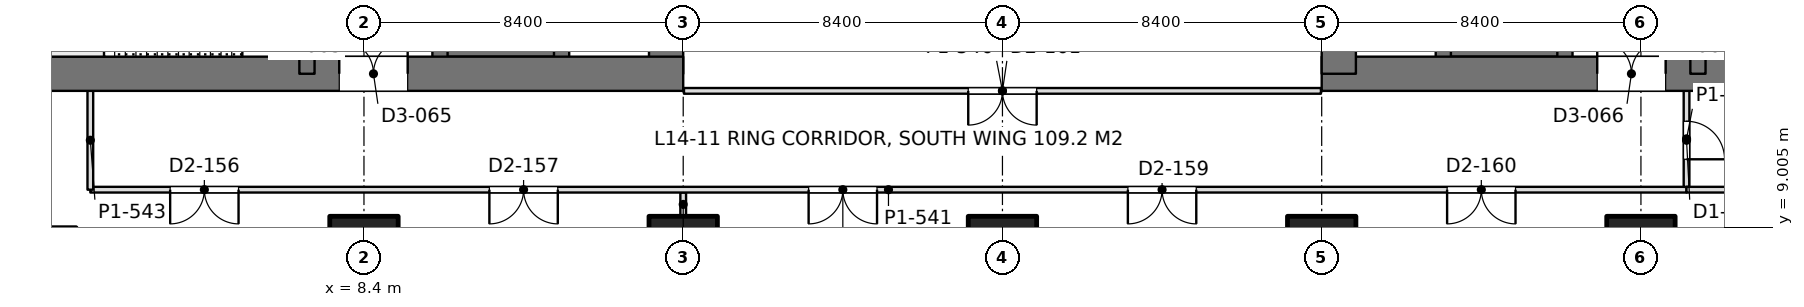
"""IFC4 building model, lengths in metres.
Left out: names, types, materials, properties, quantities, classifications, styles, units other than length and angle.
Written with IfcOpenShell. Run it as: python <this file> out.ifc"""

import sys

from ifc_helpers import new_model, si_unit, direction, frame, frame_2d, origin, origin_2d, place, context, subcontext, project, spatial, rectangle, extrude, element, fill, save


model = new_model("IFC4")
c1 = context("Model", 3, precision=1e-05, world=origin(), true_north=direction((0.0, 1.0)))
c2 = subcontext(c1, "Body", "Model", "MODEL_VIEW")
j1 = project(units=[si_unit("LENGTHUNIT", "METRE"), si_unit("PLANEANGLEUNIT", "RADIAN")], contexts=[c1])
p1 = place(None, origin())
s1 = spatial("IfcSite", under=j1, at=p1, CompositionType="ELEMENT")
p2 = place(p1, origin())
s2 = spatial("IfcBuilding", under=s1, at=p2, CompositionType="ELEMENT")
p3 = place(p2, frame((0.0, 0.0, 63.9)))
s3 = spatial("IfcBuildingStorey", under=s2, at=p3, CompositionType="ELEMENT", Elevation=63.9)
for number, where, z_axis, x_axis in (
    (1, (8.4, 8.4, 0.0), (0.0, 0.0, 1.0), (1.0, 0.0, 0.0)),
    (2, (16.8, 8.4, 0.0), (0.0, 0.0, 1.0), (1.0, 0.0, 0.0)),
    (3, (25.2, 8.4, 0.0), (0.0, 0.0, 1.0), (1.0, 0.0, 0.0)),
    (4, (33.6, 8.4, 0.0), (0.0, 0.0, 1.0), (1.0, 0.0, 0.0)),
    (5, (42.0, 8.4, 0.0), (0.0, 0.0, 1.0), (1.0, 0.0, 0.0)),
):
    element("IfcColumn", number, at=place(p3, frame(where, z_axis=z_axis, x_axis=x_axis)), inside=s3, PredefinedType="COLUMN", context=c2, shape_type="SweptSolid", body=[
        extrude(rectangle(XDim=1.8, YDim=1.8, at=origin_2d()), origin(), (0.0, 0.0, 1.0), 4.5),
    ])
p4 = place(p3, frame((-1.2, 13.05, 0.0), z_axis=(0.0, 0.0, 1.0), x_axis=(1.0, 0.0, 0.0)))
e6 = element("IfcWall", 6, at=p4, inside=s3, PredefinedType="SHEAR", context=c2, shape_type="SweptSolid", body=[
    extrude(rectangle(XDim=18.0, YDim=0.9, at=frame_2d((9.0, 0.0))), origin(), (0.0, 0.0, 1.0), 4.5),
])
p5 = place(p4, frame((8.95, 0.0, 0.0)))
e7 = element("IfcOpeningElement", 7, at=p5, cuts=e6, PredefinedType="OPENING", context=c2, shape_type="SweptSolid", body=[
    extrude(rectangle(XDim=1.8, YDim=2.4, at=frame_2d((0.9, 1.2))), frame((0.0, 0.46, 0.0), z_axis=(0.0, -1.0, 0.0), x_axis=(1.0, 0.0, 0.0)), (0.0, 0.0, 1.0), 0.92),
])
p6 = place(p3, frame((16.35, 13.05, 0.0), z_axis=(0.0, 0.0, 1.0), x_axis=(0.0, 1.0, 0.0)))
e8 = element("IfcWall", 8, at=p6, inside=s3, PredefinedType="SHEAR", context=c2, shape_type="SweptSolid", body=[
    extrude(rectangle(XDim=24.3, YDim=0.9, at=frame_2d((12.15, 0.0))), origin(), (0.0, 0.0, 1.0), 4.5),
])
p7 = place(p3, frame((6.9, 13.05, 0.0), z_axis=(0.0, 0.0, 1.0), x_axis=(0.0, 1.0, 0.0)))
e9 = element("IfcWall", 9, at=p7, inside=s3, PredefinedType="SHEAR", context=c2, shape_type="SweptSolid", body=[
    extrude(rectangle(XDim=24.3, YDim=0.4, at=frame_2d((12.15, 0.0))), origin(), (0.0, 0.0, 1.0), 4.5),
])
p8 = place(p7, frame((1.3, 0.0, 0.0)))
e10 = element("IfcOpeningElement", 10, at=p8, cuts=e9, PredefinedType="OPENING", context=c2, shape_type="SweptSolid", body=[
    extrude(rectangle(XDim=1.0, YDim=2.2, at=frame_2d((0.5, 1.1))), frame((0.0, 0.21, 0.0), z_axis=(0.0, -1.0, 0.0), x_axis=(1.0, 0.0, 0.0)), (0.0, 0.0, 1.0), 0.42),
])
p9 = place(p7, frame((22.0, 0.0, 0.0)))
e11 = element("IfcOpeningElement", 11, at=p9, cuts=e9, PredefinedType="OPENING", context=c2, shape_type="SweptSolid", body=[
    extrude(rectangle(XDim=1.0, YDim=2.2, at=frame_2d((0.5, 1.1))), frame((0.0, 0.21, 0.0), z_axis=(0.0, -1.0, 0.0), x_axis=(1.0, 0.0, 0.0)), (0.0, 0.0, 1.0), 0.42),
])
p10 = place(p7, frame((5.55, 0.0, 0.0)))
e12 = element("IfcOpeningElement", 12, at=p10, cuts=e9, PredefinedType="OPENING", context=c2, shape_type="SweptSolid", body=[
    extrude(rectangle(XDim=1.0, YDim=2.2, at=frame_2d((0.5, 1.1))), frame((0.0, 0.21, 0.0), z_axis=(0.0, -1.0, 0.0), x_axis=(1.0, 0.0, 0.0)), (0.0, 0.0, 1.0), 0.42),
])
p11 = place(p7, frame((9.55, 0.0, 0.0)))
e13 = element("IfcOpeningElement", 13, at=p11, cuts=e9, PredefinedType="OPENING", context=c2, shape_type="SweptSolid", body=[
    extrude(rectangle(XDim=1.0, YDim=2.2, at=frame_2d((0.5, 1.1))), frame((0.0, 0.21, 0.0), z_axis=(0.0, -1.0, 0.0), x_axis=(1.0, 0.0, 0.0)), (0.0, 0.0, 1.0), 0.42),
])
p12 = place(p7, frame((12.8, 0.0, 0.0)))
e14 = element("IfcOpeningElement", 14, at=p12, cuts=e9, PredefinedType="OPENING", context=c2, shape_type="SweptSolid", body=[
    extrude(rectangle(XDim=1.1, YDim=2.2, at=frame_2d((0.55, 1.1))), frame((0.0, 0.21, 0.0), z_axis=(0.0, -1.0, 0.0), x_axis=(1.0, 0.0, 0.0)), (0.0, 0.0, 1.0), 0.42),
])
p13 = place(p7, frame((15.538, 0.0, 0.0)))
e15 = element("IfcOpeningElement", 15, at=p13, cuts=e9, PredefinedType="OPENING", context=c2, shape_type="SweptSolid", body=[
    extrude(rectangle(XDim=1.1, YDim=2.2, at=frame_2d((0.55, 1.1))), frame((0.0, 0.21, 0.0), z_axis=(0.0, -1.0, 0.0), x_axis=(1.0, 0.0, 0.0)), (0.0, 0.0, 1.0), 0.42),
])
p14 = place(p7, frame((18.262, 0.0, 0.0)))
e16 = element("IfcOpeningElement", 16, at=p14, cuts=e9, PredefinedType="OPENING", context=c2, shape_type="SweptSolid", body=[
    extrude(rectangle(XDim=1.1, YDim=2.2, at=frame_2d((0.55, 1.1))), frame((0.0, 0.21, 0.0), z_axis=(0.0, -1.0, 0.0), x_axis=(1.0, 0.0, 0.0)), (0.0, 0.0, 1.0), 0.42),
])
p15 = place(p3, frame((10.4, 13.05, 0.0), z_axis=(0.0, 0.0, 1.0), x_axis=(0.0, 1.0, 0.0)))
e17 = element("IfcWall", 17, at=p15, inside=s3, PredefinedType="SHEAR", context=c2, shape_type="SweptSolid", body=[
    extrude(rectangle(XDim=24.3, YDim=0.4, at=frame_2d((12.15, 0.0))), origin(), (0.0, 0.0, 1.0), 4.5),
])
p16 = place(p15, frame((1.5, 0.0, 0.0)))
e18 = element("IfcOpeningElement", 18, at=p16, cuts=e17, PredefinedType="OPENING", context=c2, shape_type="SweptSolid", body=[
    extrude(rectangle(XDim=1.1, YDim=2.2, at=frame_2d((0.55, 1.1))), frame((0.0, 0.21, 0.0), z_axis=(0.0, -1.0, 0.0), x_axis=(1.0, 0.0, 0.0)), (0.0, 0.0, 1.0), 0.42),
])
p17 = place(p15, frame((4.35, 0.0, 0.0)))
e19 = element("IfcOpeningElement", 19, at=p17, cuts=e17, PredefinedType="OPENING", context=c2, shape_type="SweptSolid", body=[
    extrude(rectangle(XDim=1.1, YDim=2.2, at=frame_2d((0.55, 1.1))), frame((0.0, 0.21, 0.0), z_axis=(0.0, -1.0, 0.0), x_axis=(1.0, 0.0, 0.0)), (0.0, 0.0, 1.0), 0.42),
])
p18 = place(p15, frame((7.2, 0.0, 0.0)))
e20 = element("IfcOpeningElement", 20, at=p18, cuts=e17, PredefinedType="OPENING", context=c2, shape_type="SweptSolid", body=[
    extrude(rectangle(XDim=1.1, YDim=2.2, at=frame_2d((0.55, 1.1))), frame((0.0, 0.21, 0.0), z_axis=(0.0, -1.0, 0.0), x_axis=(1.0, 0.0, 0.0)), (0.0, 0.0, 1.0), 0.42),
])
p19 = place(p15, frame((21.45, 0.0, 0.0)))
e21 = element("IfcOpeningElement", 21, at=p19, cuts=e17, PredefinedType="OPENING", context=c2, shape_type="SweptSolid", body=[
    extrude(rectangle(XDim=1.1, YDim=2.2, at=frame_2d((0.55, 1.1))), frame((0.0, 0.21, 0.0), z_axis=(0.0, -1.0, 0.0), x_axis=(1.0, 0.0, 0.0)), (0.0, 0.0, 1.0), 0.42),
])
p20 = place(p3, frame((13.6, 13.05, 0.0), z_axis=(0.0, 0.0, 1.0), x_axis=(0.0, 1.0, 0.0)))
e22 = element("IfcWall", 22, at=p20, inside=s3, PredefinedType="SHEAR", context=c2, shape_type="SweptSolid", body=[
    extrude(rectangle(XDim=24.3, YDim=0.4, at=frame_2d((12.15, 0.0))), origin(), (0.0, 0.0, 1.0), 4.5),
])
p21 = place(p3, frame((10.4, 13.65, 0.0), z_axis=(0.0, 0.0, 1.0), x_axis=(1.0, 0.0, 0.0)))
e23 = element("IfcWall", 23, at=p21, inside=s3, PredefinedType="SHEAR", context=c2, shape_type="SweptSolid", body=[
    extrude(rectangle(XDim=3.2, YDim=0.3, at=frame_2d((1.6, 0.0))), origin(), (0.0, 0.0, 1.0), 4.5),
])
p22 = place(p3, frame((33.6, 13.05, 0.0), z_axis=(0.0, 0.0, 1.0), x_axis=(1.0, 0.0, 0.0)))
e24 = element("IfcWall", 24, at=p22, inside=s3, PredefinedType="SHEAR", context=c2, shape_type="SweptSolid", body=[
    extrude(rectangle(XDim=18.0, YDim=0.9, at=frame_2d((9.0, 0.0))), origin(), (0.0, 0.0, 1.0), 4.5),
])
p23 = place(p22, frame((7.25, 0.0, 0.0)))
e25 = element("IfcOpeningElement", 25, at=p23, cuts=e24, PredefinedType="OPENING", context=c2, shape_type="SweptSolid", body=[
    extrude(rectangle(XDim=1.8, YDim=2.4, at=frame_2d((0.9, 1.2))), frame((0.0, 0.46, 0.0), z_axis=(0.0, -1.0, 0.0), x_axis=(1.0, 0.0, 0.0)), (0.0, 0.0, 1.0), 0.92),
])
p24 = place(p3, frame((34.05, 13.05, 0.0), z_axis=(0.0, 0.0, 1.0), x_axis=(0.0, 1.0, 0.0)))
e26 = element("IfcWall", 26, at=p24, inside=s3, PredefinedType="SHEAR", context=c2, shape_type="SweptSolid", body=[
    extrude(rectangle(XDim=24.3, YDim=0.9, at=frame_2d((12.15, 0.0))), origin(), (0.0, 0.0, 1.0), 4.5),
])
p25 = place(p3, frame((43.5, 13.05, 0.0), z_axis=(0.0, 0.0, 1.0), x_axis=(0.0, 1.0, 0.0)))
e27 = element("IfcWall", 27, at=p25, inside=s3, PredefinedType="SHEAR", context=c2, shape_type="SweptSolid", body=[
    extrude(rectangle(XDim=24.3, YDim=0.4, at=frame_2d((12.15, 0.0))), origin(), (0.0, 0.0, 1.0), 4.5),
])
p26 = place(p25, frame((1.3, 0.0, 0.0)))
e28 = element("IfcOpeningElement", 28, at=p26, cuts=e27, PredefinedType="OPENING", context=c2, shape_type="SweptSolid", body=[
    extrude(rectangle(XDim=1.0, YDim=2.2, at=frame_2d((0.5, 1.1))), frame((0.0, 0.21, 0.0), z_axis=(0.0, -1.0, 0.0), x_axis=(1.0, 0.0, 0.0)), (0.0, 0.0, 1.0), 0.42),
])
p27 = place(p25, frame((22.0, 0.0, 0.0)))
e29 = element("IfcOpeningElement", 29, at=p27, cuts=e27, PredefinedType="OPENING", context=c2, shape_type="SweptSolid", body=[
    extrude(rectangle(XDim=1.0, YDim=2.2, at=frame_2d((0.5, 1.1))), frame((0.0, 0.21, 0.0), z_axis=(0.0, -1.0, 0.0), x_axis=(1.0, 0.0, 0.0)), (0.0, 0.0, 1.0), 0.42),
])
p28 = place(p25, frame((5.55, 0.0, 0.0)))
e30 = element("IfcOpeningElement", 30, at=p28, cuts=e27, PredefinedType="OPENING", context=c2, shape_type="SweptSolid", body=[
    extrude(rectangle(XDim=1.0, YDim=2.2, at=frame_2d((0.5, 1.1))), frame((0.0, 0.21, 0.0), z_axis=(0.0, -1.0, 0.0), x_axis=(1.0, 0.0, 0.0)), (0.0, 0.0, 1.0), 0.42),
])
p29 = place(p25, frame((9.55, 0.0, 0.0)))
e31 = element("IfcOpeningElement", 31, at=p29, cuts=e27, PredefinedType="OPENING", context=c2, shape_type="SweptSolid", body=[
    extrude(rectangle(XDim=1.0, YDim=2.2, at=frame_2d((0.5, 1.1))), frame((0.0, 0.21, 0.0), z_axis=(0.0, -1.0, 0.0), x_axis=(1.0, 0.0, 0.0)), (0.0, 0.0, 1.0), 0.42),
])
p30 = place(p25, frame((12.8, 0.0, 0.0)))
e32 = element("IfcOpeningElement", 32, at=p30, cuts=e27, PredefinedType="OPENING", context=c2, shape_type="SweptSolid", body=[
    extrude(rectangle(XDim=1.1, YDim=2.2, at=frame_2d((0.55, 1.1))), frame((0.0, 0.21, 0.0), z_axis=(0.0, -1.0, 0.0), x_axis=(1.0, 0.0, 0.0)), (0.0, 0.0, 1.0), 0.42),
])
p31 = place(p25, frame((15.538, 0.0, 0.0)))
e33 = element("IfcOpeningElement", 33, at=p31, cuts=e27, PredefinedType="OPENING", context=c2, shape_type="SweptSolid", body=[
    extrude(rectangle(XDim=1.1, YDim=2.2, at=frame_2d((0.55, 1.1))), frame((0.0, 0.21, 0.0), z_axis=(0.0, -1.0, 0.0), x_axis=(1.0, 0.0, 0.0)), (0.0, 0.0, 1.0), 0.42),
])
p32 = place(p25, frame((18.262, 0.0, 0.0)))
e34 = element("IfcOpeningElement", 34, at=p32, cuts=e27, PredefinedType="OPENING", context=c2, shape_type="SweptSolid", body=[
    extrude(rectangle(XDim=1.1, YDim=2.2, at=frame_2d((0.55, 1.1))), frame((0.0, 0.21, 0.0), z_axis=(0.0, -1.0, 0.0), x_axis=(1.0, 0.0, 0.0)), (0.0, 0.0, 1.0), 0.42),
])
p33 = place(p3, frame((40.0, 13.05, 0.0), z_axis=(0.0, 0.0, 1.0), x_axis=(0.0, 1.0, 0.0)))
e35 = element("IfcWall", 35, at=p33, inside=s3, PredefinedType="SHEAR", context=c2, shape_type="SweptSolid", body=[
    extrude(rectangle(XDim=24.3, YDim=0.4, at=frame_2d((12.15, 0.0))), origin(), (0.0, 0.0, 1.0), 4.5),
])
p34 = place(p33, frame((1.5, 0.0, 0.0)))
e36 = element("IfcOpeningElement", 36, at=p34, cuts=e35, PredefinedType="OPENING", context=c2, shape_type="SweptSolid", body=[
    extrude(rectangle(XDim=1.1, YDim=2.2, at=frame_2d((0.55, 1.1))), frame((0.0, 0.21, 0.0), z_axis=(0.0, -1.0, 0.0), x_axis=(1.0, 0.0, 0.0)), (0.0, 0.0, 1.0), 0.42),
])
p35 = place(p33, frame((4.35, 0.0, 0.0)))
e37 = element("IfcOpeningElement", 37, at=p35, cuts=e35, PredefinedType="OPENING", context=c2, shape_type="SweptSolid", body=[
    extrude(rectangle(XDim=1.1, YDim=2.2, at=frame_2d((0.55, 1.1))), frame((0.0, 0.21, 0.0), z_axis=(0.0, -1.0, 0.0), x_axis=(1.0, 0.0, 0.0)), (0.0, 0.0, 1.0), 0.42),
])
p36 = place(p33, frame((7.2, 0.0, 0.0)))
e38 = element("IfcOpeningElement", 38, at=p36, cuts=e35, PredefinedType="OPENING", context=c2, shape_type="SweptSolid", body=[
    extrude(rectangle(XDim=1.1, YDim=2.2, at=frame_2d((0.55, 1.1))), frame((0.0, 0.21, 0.0), z_axis=(0.0, -1.0, 0.0), x_axis=(1.0, 0.0, 0.0)), (0.0, 0.0, 1.0), 0.42),
])
p37 = place(p33, frame((21.45, 0.0, 0.0)))
e39 = element("IfcOpeningElement", 39, at=p37, cuts=e35, PredefinedType="OPENING", context=c2, shape_type="SweptSolid", body=[
    extrude(rectangle(XDim=1.1, YDim=2.2, at=frame_2d((0.55, 1.1))), frame((0.0, 0.21, 0.0), z_axis=(0.0, -1.0, 0.0), x_axis=(1.0, 0.0, 0.0)), (0.0, 0.0, 1.0), 0.42),
])
p38 = place(p3, frame((36.8, 13.05, 0.0), z_axis=(0.0, 0.0, 1.0), x_axis=(0.0, 1.0, 0.0)))
e40 = element("IfcWall", 40, at=p38, inside=s3, PredefinedType="SHEAR", context=c2, shape_type="SweptSolid", body=[
    extrude(rectangle(XDim=24.3, YDim=0.4, at=frame_2d((12.15, 0.0))), origin(), (0.0, 0.0, 1.0), 4.5),
])
p39 = place(p3, frame((40.0, 13.65, 0.0), z_axis=(0.0, 0.0, 1.0), x_axis=(-1.0, 0.0, 0.0)))
e41 = element("IfcWall", 41, at=p39, inside=s3, PredefinedType="SHEAR", context=c2, shape_type="SweptSolid", body=[
    extrude(rectangle(XDim=3.2, YDim=0.3, at=frame_2d((1.6, 0.0))), origin(), (0.0, 0.0, 1.0), 4.5),
])
p40 = place(p3, frame((16.8, 9.299, 0.0), z_axis=(0.0, 0.0, 1.0), x_axis=(0.0, 1.0, 0.0)))
e42 = element("IfcWall", 42, at=p40, inside=s3, PredefinedType="PARTITIONING", context=c2, shape_type="SweptSolid", body=[
    extrude(rectangle(XDim=0.627, YDim=0.15, at=frame_2d((0.313, 0.0))), origin(), (0.0, 0.0, 1.0), 3.98),
])
p41 = place(p3, frame((1.2, 10.0, 0.0), z_axis=(0.0, 0.0, 1.0), x_axis=(1.0, 0.0, 0.0)))
e43 = element("IfcWall", 43, at=p41, inside=s3, PredefinedType="PARTITIONING", context=c2, shape_type="SweptSolid", body=[
    extrude(rectangle(XDim=42.002, YDim=0.15, at=frame_2d((21.001, 0.0))), origin(), (0.0, 0.0, 1.0), 3.74),
])
p42 = place(p41, frame((2.1, 0.0, 0.0)))
e44 = element("IfcOpeningElement", 44, at=p42, cuts=e43, PredefinedType="OPENING", context=c2, shape_type="SweptSolid", body=[
    extrude(rectangle(XDim=1.8, YDim=2.2, at=frame_2d((0.9, 1.1))), frame((0.0, 0.085, 0.0), z_axis=(0.0, -1.0, 0.0), x_axis=(1.0, 0.0, 0.0)), (0.0, 0.0, 1.0), 0.17),
])
p43 = place(p41, frame((10.5, 0.0, 0.0)))
e45 = element("IfcOpeningElement", 45, at=p43, cuts=e43, PredefinedType="OPENING", context=c2, shape_type="SweptSolid", body=[
    extrude(rectangle(XDim=1.8, YDim=2.2, at=frame_2d((0.9, 1.1))), frame((0.0, 0.085, 0.0), z_axis=(0.0, -1.0, 0.0), x_axis=(1.0, 0.0, 0.0)), (0.0, 0.0, 1.0), 0.17),
])
p44 = place(p41, frame((18.9, 0.0, 0.0)))
e46 = element("IfcOpeningElement", 46, at=p44, cuts=e43, PredefinedType="OPENING", context=c2, shape_type="SweptSolid", body=[
    extrude(rectangle(XDim=1.8, YDim=2.2, at=frame_2d((0.9, 1.1))), frame((0.0, 0.085, 0.0), z_axis=(0.0, -1.0, 0.0), x_axis=(1.0, 0.0, 0.0)), (0.0, 0.0, 1.0), 0.17),
])
p45 = place(p41, frame((27.3, 0.0, 0.0)))
e47 = element("IfcOpeningElement", 47, at=p45, cuts=e43, PredefinedType="OPENING", context=c2, shape_type="SweptSolid", body=[
    extrude(rectangle(XDim=1.8, YDim=2.2, at=frame_2d((0.9, 1.1))), frame((0.0, 0.085, 0.0), z_axis=(0.0, -1.0, 0.0), x_axis=(1.0, 0.0, 0.0)), (0.0, 0.0, 1.0), 0.17),
])
p46 = place(p41, frame((35.7, 0.0, 0.0)))
e48 = element("IfcOpeningElement", 48, at=p46, cuts=e43, PredefinedType="OPENING", context=c2, shape_type="SweptSolid", body=[
    extrude(rectangle(XDim=1.8, YDim=2.2, at=frame_2d((0.9, 1.1))), frame((0.0, 0.085, 0.0), z_axis=(0.0, -1.0, 0.0), x_axis=(1.0, 0.0, 0.0)), (0.0, 0.0, 1.0), 0.17),
])
p47 = place(p3, frame((1.2, 10.0, 0.0), z_axis=(0.0, 0.0, 1.0), x_axis=(0.0, 1.0, 0.0)))
e49 = element("IfcWall", 49, at=p47, inside=s3, PredefinedType="PARTITIONING", context=c2, shape_type="SweptSolid", body=[
    extrude(rectangle(XDim=2.602, YDim=0.15, at=frame_2d((1.301, 0.0))), origin(), (0.0, 0.0, 1.0), 4.34),
])
p48 = place(p3, frame((43.2, 10.074, 0.0), z_axis=(0.0, 0.0, 1.0), x_axis=(0.0, 1.0, 0.0)))
e50 = element("IfcWall", 50, at=p48, inside=s3, PredefinedType="PARTITIONING", context=c2, shape_type="SweptSolid", body=[
    extrude(rectangle(XDim=2.528, YDim=0.15, at=frame_2d((1.264, 0.0))), origin(), (0.0, 0.0, 1.0), 4.34),
])
p49 = place(p48, frame((0.726, 0.0, 0.0)))
e51 = element("IfcOpeningElement", 51, at=p49, cuts=e50, PredefinedType="OPENING", context=c2, shape_type="SweptSolid", body=[
    extrude(rectangle(XDim=1.0, YDim=2.2, at=frame_2d((0.5, 1.1))), frame((0.0, 0.085, 0.0), z_axis=(0.0, -1.0, 0.0), x_axis=(1.0, 0.0, 0.0)), (0.0, 0.0, 1.0), 0.17),
])
p50 = place(p3, frame((43.198, 10.0, 0.0), z_axis=(0.0, 0.0, 1.0), x_axis=(1.0, 0.0, 0.0)))
e52 = element("IfcWall", 52, at=p50, inside=s3, PredefinedType="PARTITIONING", context=c2, shape_type="SweptSolid", body=[
    extrude(rectangle(XDim=6.002, YDim=0.15, at=frame_2d((3.001, 0.0))), origin(), (0.0, 0.0, 1.0), 4.34),
])
p51 = place(p3, frame((16.82, 12.6, 0.0), z_axis=(0.0, 0.0, 1.0), x_axis=(1.0, 0.0, 0.0)))
e53 = element("IfcWall", 53, at=p51, inside=s3, PredefinedType="PARTITIONING", context=c2, shape_type="SweptSolid", body=[
    extrude(rectangle(XDim=16.76, YDim=0.15, at=frame_2d((8.38, 0.0))), origin(), (0.0, 0.0, 1.0), 3.74),
])
p52 = place(p51, frame((7.48, 0.0, 0.0)))
e54 = element("IfcOpeningElement", 54, at=p52, cuts=e53, PredefinedType="OPENING", context=c2, shape_type="SweptSolid", body=[
    extrude(rectangle(XDim=1.8, YDim=2.2, at=frame_2d((0.9, 1.1))), frame((0.0, 0.085, 0.0), z_axis=(0.0, -1.0, 0.0), x_axis=(1.0, 0.0, 0.0)), (0.0, 0.0, 1.0), 0.17),
])
p53 = place(p5, origin())
e55 = element("IfcDoor", 55, at=p53, inside=s3, OperationType="DOUBLE_DOOR_SINGLE_SWING", PredefinedType="DOOR", context=c2, shape_type="SweptSolid", body=[
    extrude(rectangle(XDim=1.8, YDim=2.4, at=frame_2d((0.9, 1.2))), frame((0.0, 0.025, 0.0), z_axis=(0.0, -1.0, 0.0), x_axis=(1.0, 0.0, 0.0)), (0.0, 0.0, 1.0), 0.05),
])
fill(e7, e55)
p54 = place(p23, origin())
e56 = element("IfcDoor", 56, at=p54, inside=s3, OperationType="DOUBLE_DOOR_SINGLE_SWING", PredefinedType="DOOR", context=c2, shape_type="SweptSolid", body=[
    extrude(rectangle(XDim=1.8, YDim=2.4, at=frame_2d((0.9, 1.2))), frame((0.0, 0.025, 0.0), z_axis=(0.0, -1.0, 0.0), x_axis=(1.0, 0.0, 0.0)), (0.0, 0.0, 1.0), 0.05),
])
fill(e25, e56)
p55 = place(p42, frame((1.8, 0.0, 0.0), z_axis=(0.0, 0.0, 1.0), x_axis=(-1.0, 0.0, 0.0)))
e57 = element("IfcDoor", 57, at=p55, inside=s3, OperationType="DOUBLE_DOOR_SINGLE_SWING", PredefinedType="DOOR", context=c2, shape_type="SweptSolid", body=[
    extrude(rectangle(XDim=1.8, YDim=2.2, at=frame_2d((0.9, 1.1))), frame((0.0, 0.025, 0.0), z_axis=(0.0, -1.0, 0.0), x_axis=(1.0, 0.0, 0.0)), (0.0, 0.0, 1.0), 0.05),
])
fill(e44, e57)
p56 = place(p43, frame((1.8, 0.0, 0.0), z_axis=(0.0, 0.0, 1.0), x_axis=(-1.0, 0.0, 0.0)))
e58 = element("IfcDoor", 58, at=p56, inside=s3, OperationType="DOUBLE_DOOR_SINGLE_SWING", PredefinedType="DOOR", context=c2, shape_type="SweptSolid", body=[
    extrude(rectangle(XDim=1.8, YDim=2.2, at=frame_2d((0.9, 1.1))), frame((0.0, 0.025, 0.0), z_axis=(0.0, -1.0, 0.0), x_axis=(1.0, 0.0, 0.0)), (0.0, 0.0, 1.0), 0.05),
])
fill(e45, e58)
p57 = place(p44, frame((1.8, 0.0, 0.0), z_axis=(0.0, 0.0, 1.0), x_axis=(-1.0, 0.0, 0.0)))
e59 = element("IfcDoor", 59, at=p57, inside=s3, OperationType="DOUBLE_DOOR_SINGLE_SWING", PredefinedType="DOOR", context=c2, shape_type="SweptSolid", body=[
    extrude(rectangle(XDim=1.8, YDim=2.2, at=frame_2d((0.9, 1.1))), frame((0.0, 0.025, 0.0), z_axis=(0.0, -1.0, 0.0), x_axis=(1.0, 0.0, 0.0)), (0.0, 0.0, 1.0), 0.05),
])
fill(e46, e59)
p58 = place(p45, frame((1.8, 0.0, 0.0), z_axis=(0.0, 0.0, 1.0), x_axis=(-1.0, 0.0, 0.0)))
e60 = element("IfcDoor", 60, at=p58, inside=s3, OperationType="DOUBLE_DOOR_SINGLE_SWING", PredefinedType="DOOR", context=c2, shape_type="SweptSolid", body=[
    extrude(rectangle(XDim=1.8, YDim=2.2, at=frame_2d((0.9, 1.1))), frame((0.0, 0.025, 0.0), z_axis=(0.0, -1.0, 0.0), x_axis=(1.0, 0.0, 0.0)), (0.0, 0.0, 1.0), 0.05),
])
fill(e47, e60)
p59 = place(p46, frame((1.8, 0.0, 0.0), z_axis=(0.0, 0.0, 1.0), x_axis=(-1.0, 0.0, 0.0)))
e61 = element("IfcDoor", 61, at=p59, inside=s3, OperationType="DOUBLE_DOOR_SINGLE_SWING", PredefinedType="DOOR", context=c2, shape_type="SweptSolid", body=[
    extrude(rectangle(XDim=1.8, YDim=2.2, at=frame_2d((0.9, 1.1))), frame((0.0, 0.025, 0.0), z_axis=(0.0, -1.0, 0.0), x_axis=(1.0, 0.0, 0.0)), (0.0, 0.0, 1.0), 0.05),
])
fill(e48, e61)
p60 = place(p49, frame((1.0, 0.0, 0.0), z_axis=(0.0, 0.0, 1.0), x_axis=(-1.0, 0.0, 0.0)))
e62 = element("IfcDoor", 62, at=p60, inside=s3, OperationType="SINGLE_SWING_RIGHT", PredefinedType="DOOR", context=c2, shape_type="SweptSolid", body=[
    extrude(rectangle(XDim=1.0, YDim=2.2, at=frame_2d((0.5, 1.1))), frame((0.0, 0.025, 0.0), z_axis=(0.0, -1.0, 0.0), x_axis=(1.0, 0.0, 0.0)), (0.0, 0.0, 1.0), 0.05),
])
fill(e51, e62)
p61 = place(p52, frame((1.8, 0.0, 0.0), z_axis=(0.0, 0.0, 1.0), x_axis=(-1.0, 0.0, 0.0)))
e63 = element("IfcDoor", 63, at=p61, inside=s3, OperationType="DOUBLE_DOOR_SINGLE_SWING", PredefinedType="DOOR", context=c2, shape_type="SweptSolid", body=[
    extrude(rectangle(XDim=1.8, YDim=2.2, at=frame_2d((0.9, 1.1))), frame((0.0, 0.025, 0.0), z_axis=(0.0, -1.0, 0.0), x_axis=(1.0, 0.0, 0.0)), (0.0, 0.0, 1.0), 0.05),
])
fill(e54, e63)
save(model, sys.argv[1])
